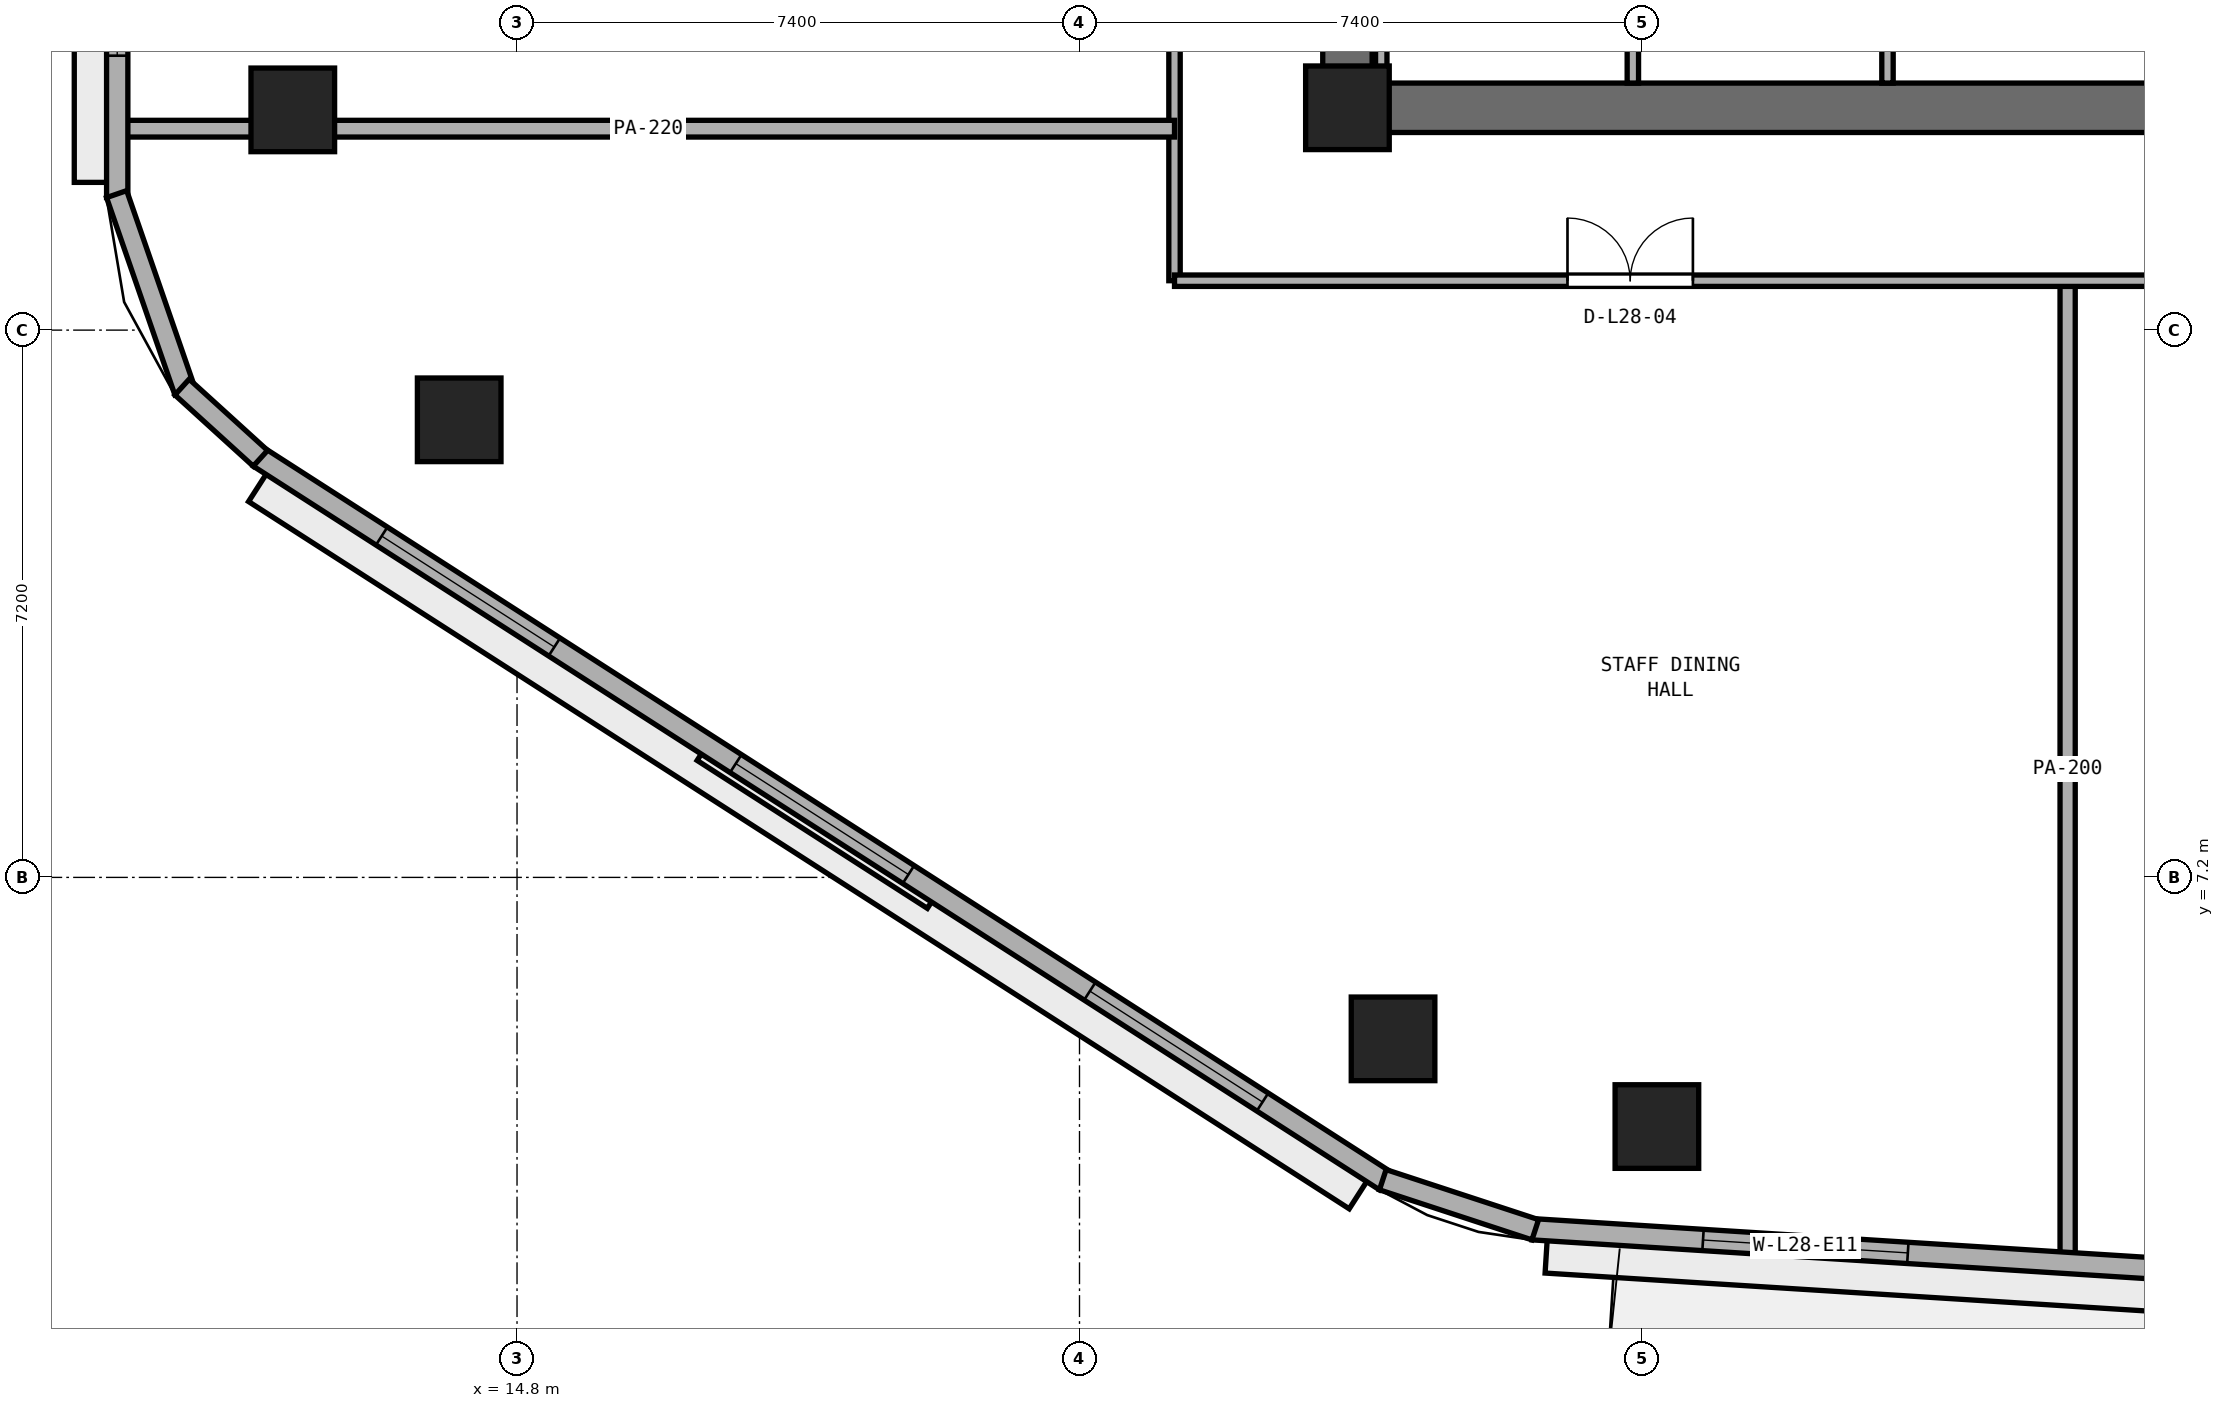
"""IFC4 building model, lengths in metres.
Left out: names, types, materials, properties, quantities, classifications, styles, units other than length and angle.
Written with IfcOpenShell. Run it as: python <this file> out.ifc"""

import sys

from ifc_helpers import new_model, si_unit, direction, frame, frame_2d, origin, origin_2d, place, context, subcontext, project, spatial, rectangle, extrude, element, fill, save


model = new_model("IFC4")
c1 = context("Model", 3, precision=1e-05, world=origin(), true_north=direction((0.0, 1.0)))
c2 = subcontext(c1, "Body", "Model", "MODEL_VIEW")
j1 = project(units=[si_unit("LENGTHUNIT", "METRE"), si_unit("PLANEANGLEUNIT", "RADIAN")], contexts=[c1])
p1 = place(None, origin())
s1 = spatial("IfcSite", under=j1, at=p1, CompositionType="ELEMENT")
p2 = place(p1, origin())
s2 = spatial("IfcBuilding", under=s1, at=p2, CompositionType="ELEMENT")
p3 = place(p2, frame((0.0, 0.0, 112.4)))
s3 = spatial("IfcBuildingStorey", under=s2, at=p3, CompositionType="ELEMENT", Elevation=112.4)
p4 = place(p3, frame((25.4, 17.325, 0.0), z_axis=(0.0, 0.0, 1.0), x_axis=(1.0, 0.0, 0.0)))
e1 = element("IfcWall", 1, at=p4, inside=s3, PredefinedType="SHEAR", context=c2, shape_type="SweptSolid", body=[
    extrude(rectangle(XDim=23.2, YDim=0.65, at=frame_2d((11.6, 0.0))), origin(), (0.0, 0.0, 1.0), 3.525),
])
p5 = place(p3, frame((25.725, 17.65, 0.0), z_axis=(0.0, 0.0, 1.0), x_axis=(0.0, 1.0, 0.0)))
e2 = element("IfcWall", 2, at=p5, inside=s3, PredefinedType="SHEAR", context=c2, shape_type="SweptSolid", body=[
    extrude(rectangle(XDim=15.1, YDim=0.65, at=frame_2d((7.55, 0.0))), origin(), (0.0, 0.0, 1.0), 3.525),
])
p6 = place(p5, frame((6.8, 0.0, 0.0)))
e3 = element("IfcOpeningElement", 3, at=p6, cuts=e2, PredefinedType="OPENING", context=c2, shape_type="SweptSolid", body=[
    extrude(rectangle(XDim=1.5, YDim=2.15, at=frame_2d((0.75, 1.075))), frame((0.0, 0.335, 0.0), z_axis=(0.0, -1.0, 0.0), x_axis=(1.0, 0.0, 0.0)), (0.0, 0.0, 1.0), 0.67),
])
p7 = place(p3, frame((25.725, 17.325, 0.0), z_axis=(0.0, 0.0, 1.0), x_axis=(1.0, 0.0, 0.0)))
e4 = element("IfcColumn", 4, at=p7, inside=s3, PredefinedType="PILASTER", context=c2, shape_type="SweptSolid", body=[
    extrude(rectangle(XDim=1.1, YDim=1.1, at=origin_2d()), origin(), (0.0, 0.0, 1.0), 3.8),
])
for number, where, z_axis, x_axis in (
    (5, (29.796, 3.922, 0.0), (0.0, 0.0, 1.0), (1.0, 0.0, 0.0)),
    (6, (11.85, 17.298, 0.0), (0.0, 0.0, 1.0), (1.0, 0.0, 0.0)),
    (7, (14.039, 13.22, 0.0), (0.0, 0.0, 1.0), (1.0, 0.0, 0.0)),
    (8, (26.325, 5.076, 0.0), (0.0, 0.0, 1.0), (1.0, 0.0, 0.0)),
):
    element("IfcColumn", number, at=place(p3, frame(where, z_axis=z_axis, x_axis=x_axis)), inside=s3, PredefinedType="COLUMN", context=c2, shape_type="SweptSolid", body=[
        extrude(rectangle(XDim=1.1, YDim=1.1, at=origin_2d()), origin(), (0.0, 0.0, 1.0), 3.8),
    ])
for number, where, z_axis, x_axis in (
    (9, (26.17, 17.65, 0.0), (0.0, 0.0, 1.0), (0.0, 1.0, 0.0)),
    (10, (29.48, 17.65, 0.0), (0.0, 0.0, 1.0), (0.0, 1.0, 0.0)),
    (11, (32.83, 17.65, 0.0), (0.0, 0.0, 1.0), (0.0, 1.0, 0.0)),
):
    element("IfcWall", number, at=place(p3, frame(where, z_axis=z_axis, x_axis=x_axis)), inside=s3, PredefinedType="PARTITIONING", context=c2, shape_type="SweptSolid", body=[
        extrude(rectangle(XDim=2.1, YDim=0.15, at=frame_2d((1.05, 0.0))), origin(), (0.0, 0.0, 1.0), 3.525),
    ])
p8 = place(p3, frame((35.2, 2.192, 0.0), z_axis=(0.0, 0.0, 1.0), x_axis=(0.0, 1.0, 0.0)))
e12 = element("IfcWall", 12, at=p8, inside=s3, PredefinedType="PARTITIONING", context=c2, shape_type="SweptSolid", body=[
    extrude(rectangle(XDim=12.858, YDim=0.2, at=frame_2d((6.429, 0.0))), origin(), (0.0, 0.0, 1.0), 3.525),
])
p9 = place(p3, frame((23.45, 15.05, 0.0), z_axis=(0.0, 0.0, 1.0), x_axis=(0.0, 1.0, 0.0)))
e13 = element("IfcWall", 13, at=p9, inside=s3, PredefinedType="PARTITIONING", context=c2, shape_type="SweptSolid", body=[
    extrude(rectangle(XDim=20.3, YDim=0.15, at=frame_2d((10.15, 0.0))), origin(), (0.0, 0.0, 1.0), 3.525),
])
p10 = place(p9, frame((8.025, 0.0, 0.0)))
e14 = element("IfcOpeningElement", 14, at=p10, cuts=e13, PredefinedType="OPENING", context=c2, shape_type="SweptSolid", body=[
    extrude(rectangle(XDim=0.9, YDim=2.1, at=frame_2d((0.45, 1.05))), frame((0.0, 0.085, 0.0), z_axis=(0.0, -1.0, 0.0), x_axis=(1.0, 0.0, 0.0)), (0.0, 0.0, 1.0), 0.17),
])
p11 = place(p9, frame((16.175, 0.0, 0.0)))
e15 = element("IfcOpeningElement", 15, at=p11, cuts=e13, PredefinedType="OPENING", context=c2, shape_type="SweptSolid", body=[
    extrude(rectangle(XDim=0.9, YDim=2.1, at=frame_2d((0.45, 1.05))), frame((0.0, 0.085, 0.0), z_axis=(0.0, -1.0, 0.0), x_axis=(1.0, 0.0, 0.0)), (0.0, 0.0, 1.0), 0.17),
])
p12 = place(p3, frame((23.45, 15.05, 0.0), z_axis=(0.0, 0.0, 1.0), x_axis=(1.0, 0.0, 0.0)))
e16 = element("IfcWall", 16, at=p12, inside=s3, PredefinedType="PARTITIONING", context=c2, shape_type="SweptSolid", body=[
    extrude(rectangle(XDim=27.1, YDim=0.15, at=frame_2d((13.55, 0.0))), origin(), (0.0, 0.0, 1.0), 3.525),
])
p13 = place(p12, frame((5.17, 0.0, 0.0)))
e17 = element("IfcOpeningElement", 17, at=p13, cuts=e16, PredefinedType="OPENING", context=c2, shape_type="SweptSolid", body=[
    extrude(rectangle(XDim=1.65, YDim=2.15, at=frame_2d((0.825, 1.075))), frame((0.0, 0.085, 0.0), z_axis=(0.0, -1.0, 0.0), x_axis=(1.0, 0.0, 0.0)), (0.0, 0.0, 1.0), 0.17),
])
p14 = place(p12, frame((18.855, 0.0, 0.0)))
e18 = element("IfcOpeningElement", 18, at=p14, cuts=e16, PredefinedType="OPENING", context=c2, shape_type="SweptSolid", body=[
    extrude(rectangle(XDim=0.9, YDim=2.1, at=frame_2d((0.45, 1.05))), frame((0.0, 0.085, 0.0), z_axis=(0.0, -1.0, 0.0), x_axis=(1.0, 0.0, 0.0)), (0.0, 0.0, 1.0), 0.17),
])
p15 = place(p3, frame((9.605, 17.05, 0.0), z_axis=(0.0, 0.0, 1.0), x_axis=(1.0, 0.0, 0.0)))
e19 = element("IfcWall", 19, at=p15, inside=s3, PredefinedType="PARTITIONING", context=c2, shape_type="SweptSolid", body=[
    extrude(rectangle(XDim=13.845, YDim=0.22, at=frame_2d((6.922, 0.0))), origin(), (0.0, 0.0, 1.0), 2.908),
])
p16 = place(p3, frame((28.161, 2.571, 0.0), z_axis=(0.0, 0.0, 1.0), x_axis=(0.998017288298, -0.06294038654, 0.0)))
e20 = element("IfcWall", 20, at=p16, inside=s3, PredefinedType="STANDARD", context=c2, shape_type="SweptSolid", body=[
    extrude(rectangle(XDim=19.577, YDim=0.28, at=frame_2d((9.789, 0.0))), origin(), (0.0, 0.0, 1.0), 3.525),
])
p17 = place(p16, frame((9.239, 0.0, 0.0)))
e21 = element("IfcOpeningElement", 21, at=p17, cuts=e20, PredefinedType="OPENING", context=c2, shape_type="SweptSolid", body=[
    extrude(rectangle(XDim=1.1, YDim=2.2, at=frame_2d((0.55, 1.1))), frame((0.0, 0.15, 0.0), z_axis=(0.0, -1.0, 0.0), x_axis=(1.0, 0.0, 0.0)), (0.0, 0.0, 1.0), 0.3),
])
p18 = place(p16, frame((2.246, 0.0, 0.9)))
e22 = element("IfcOpeningElement", 22, at=p18, cuts=e20, PredefinedType="OPENING", context=c2, shape_type="SweptSolid", body=[
    extrude(rectangle(XDim=2.7, YDim=1.75, at=frame_2d((1.35, 0.875))), frame((0.0, 0.15, 0.0), z_axis=(0.0, -1.0, 0.0), x_axis=(1.0, 0.0, 0.0)), (0.0, 0.0, 1.0), 0.3),
])
p19 = place(p16, frame((14.631, 0.0, 0.9)))
e23 = element("IfcOpeningElement", 23, at=p19, cuts=e20, PredefinedType="OPENING", context=c2, shape_type="SweptSolid", body=[
    extrude(rectangle(XDim=2.7, YDim=1.75, at=frame_2d((1.35, 0.875))), frame((0.0, 0.15, 0.0), z_axis=(0.0, -1.0, 0.0), x_axis=(1.0, 0.0, 0.0)), (0.0, 0.0, 1.0), 0.3),
])
p20 = place(p3, frame((9.54, 33.444, 0.0), z_axis=(0.0, 0.0, 1.0), x_axis=(0.0, -1.0, 0.0)))
e24 = element("IfcWall", 24, at=p20, inside=s3, PredefinedType="STANDARD", context=c2, shape_type="SweptSolid", body=[
    extrude(rectangle(XDim=17.301, YDim=0.28, at=frame_2d((8.65, 0.0))), origin(), (0.0, 0.0, 1.0), 3.525),
])
p21 = place(p20, frame((7.3, 0.0, 0.9)))
e25 = element("IfcOpeningElement", 25, at=p21, cuts=e24, PredefinedType="OPENING", context=c2, shape_type="SweptSolid", body=[
    extrude(rectangle(XDim=2.7, YDim=1.75, at=frame_2d((1.35, 0.875))), frame((0.0, 0.15, 0.0), z_axis=(0.0, -1.0, 0.0), x_axis=(1.0, 0.0, 0.0)), (0.0, 0.0, 1.0), 0.3),
])
p22 = place(p20, frame((12.734, 0.0, 0.9)))
e26 = element("IfcOpeningElement", 26, at=p22, cuts=e24, PredefinedType="OPENING", context=c2, shape_type="SweptSolid", body=[
    extrude(rectangle(XDim=2.7, YDim=1.75, at=frame_2d((1.35, 0.875))), frame((0.0, 0.15, 0.0), z_axis=(0.0, -1.0, 0.0), x_axis=(1.0, 0.0, 0.0)), (0.0, 0.0, 1.0), 0.3),
])
p23 = place(p3, frame((11.405, 12.728, 0.0), z_axis=(0.0, 0.0, 1.0), x_axis=(0.841304564637, -0.540561402175, 0.0)))
e27 = element("IfcWall", 27, at=p23, inside=s3, PredefinedType="STANDARD", context=c2, shape_type="SweptSolid", body=[
    extrude(rectangle(XDim=17.612, YDim=0.28, at=frame_2d((8.806, 0.0))), origin(), (0.0, 0.0, 1.0), 3.525),
])
p24 = place(p23, frame((1.919, 0.0, 0.9)))
e28 = element("IfcOpeningElement", 28, at=p24, cuts=e27, PredefinedType="OPENING", context=c2, shape_type="SweptSolid", body=[
    extrude(rectangle(XDim=2.7, YDim=1.75, at=frame_2d((1.35, 0.875))), frame((0.0, 0.15, 0.0), z_axis=(0.0, -1.0, 0.0), x_axis=(1.0, 0.0, 0.0)), (0.0, 0.0, 1.0), 0.3),
])
p25 = place(p23, frame((7.456, 0.0, 0.9)))
e29 = element("IfcOpeningElement", 29, at=p25, cuts=e27, PredefinedType="OPENING", context=c2, shape_type="SweptSolid", body=[
    extrude(rectangle(XDim=2.7, YDim=1.75, at=frame_2d((1.35, 0.875))), frame((0.0, 0.15, 0.0), z_axis=(0.0, -1.0, 0.0), x_axis=(1.0, 0.0, 0.0)), (0.0, 0.0, 1.0), 0.3),
])
p26 = place(p23, frame((12.993, 0.0, 0.9)))
e30 = element("IfcOpeningElement", 30, at=p26, cuts=e27, PredefinedType="OPENING", context=c2, shape_type="SweptSolid", body=[
    extrude(rectangle(XDim=2.7, YDim=1.75, at=frame_2d((1.35, 0.875))), frame((0.0, 0.15, 0.0), z_axis=(0.0, -1.0, 0.0), x_axis=(1.0, 0.0, 0.0)), (0.0, 0.0, 1.0), 0.3),
])
p27 = place(p3, frame((9.532, 16.189, 0.0), z_axis=(0.0, 0.0, 1.0), x_axis=(0.32708309668, -0.944995580871, 0.0)))
e31 = element("IfcWall", 31, at=p27, inside=s3, PredefinedType="STANDARD", context=c2, shape_type="SweptSolid", body=[
    extrude(rectangle(XDim=2.748, YDim=0.28, at=frame_2d((1.374, 0.0))), origin(), (0.0, 0.0, 1.0), 3.525),
])
p28 = place(p3, frame((10.393, 13.651, 0.0), z_axis=(0.0, 0.0, 1.0), x_axis=(0.74003521851, -0.672568119498, 0.0)))
e32 = element("IfcWall", 32, at=p28, inside=s3, PredefinedType="STANDARD", context=c2, shape_type="SweptSolid", body=[
    extrude(rectangle(XDim=1.393, YDim=0.28, at=frame_2d((0.697, 0.0))), origin(), (0.0, 0.0, 1.0), 3.525),
])
p29 = place(p3, frame((26.19, 3.223, 0.0), z_axis=(0.0, 0.0, 1.0), x_axis=(0.95016442175, -0.311749212734, 0.0)))
e33 = element("IfcWall", 33, at=p29, inside=s3, PredefinedType="STANDARD", context=c2, shape_type="SweptSolid", body=[
    extrude(rectangle(XDim=2.111, YDim=0.28, at=frame_2d((1.056, 0.0))), origin(), (0.0, 0.0, 1.0), 3.525),
])
p30 = place(p13, origin())
e34 = element("IfcDoor", 34, at=p30, inside=s3, OperationType="DOUBLE_DOOR_SINGLE_SWING", PredefinedType="DOOR", context=c2, shape_type="SweptSolid", body=[
    extrude(rectangle(XDim=1.65, YDim=2.15, at=frame_2d((0.825, 1.075))), frame((0.0, 0.025, 0.0), z_axis=(0.0, -1.0, 0.0), x_axis=(1.0, 0.0, 0.0)), (0.0, 0.0, 1.0), 0.05),
])
fill(e17, e34)
p31 = place(p18, origin())
e35 = element("IfcWindow", 35, at=p31, inside=s3, PartitioningType="SINGLE_PANEL", PredefinedType="WINDOW", context=c2, shape_type="SweptSolid", body=[
    extrude(rectangle(XDim=2.7, YDim=1.75, at=frame_2d((1.35, 0.875))), frame((0.0, 0.03, 0.0), z_axis=(0.0, -1.0, 0.0), x_axis=(1.0, 0.0, 0.0)), (0.0, 0.0, 1.0), 0.06),
])
fill(e22, e35)
p32 = place(p22, origin())
e36 = element("IfcWindow", 36, at=p32, inside=s3, PartitioningType="SINGLE_PANEL", PredefinedType="WINDOW", context=c2, shape_type="SweptSolid", body=[
    extrude(rectangle(XDim=2.7, YDim=1.75, at=frame_2d((1.35, 0.875))), frame((0.0, 0.03, 0.0), z_axis=(0.0, -1.0, 0.0), x_axis=(1.0, 0.0, 0.0)), (0.0, 0.0, 1.0), 0.06),
])
fill(e26, e36)
p33 = place(p24, origin())
e37 = element("IfcWindow", 37, at=p33, inside=s3, PartitioningType="SINGLE_PANEL", PredefinedType="WINDOW", context=c2, shape_type="SweptSolid", body=[
    extrude(rectangle(XDim=2.7, YDim=1.75, at=frame_2d((1.35, 0.875))), frame((0.0, 0.03, 0.0), z_axis=(0.0, -1.0, 0.0), x_axis=(1.0, 0.0, 0.0)), (0.0, 0.0, 1.0), 0.06),
])
fill(e28, e37)
p34 = place(p25, origin())
e38 = element("IfcWindow", 38, at=p34, inside=s3, PartitioningType="SINGLE_PANEL", PredefinedType="WINDOW", context=c2, shape_type="SweptSolid", body=[
    extrude(rectangle(XDim=2.7, YDim=1.75, at=frame_2d((1.35, 0.875))), frame((0.0, 0.03, 0.0), z_axis=(0.0, -1.0, 0.0), x_axis=(1.0, 0.0, 0.0)), (0.0, 0.0, 1.0), 0.06),
])
fill(e29, e38)
p35 = place(p26, origin())
e39 = element("IfcWindow", 39, at=p35, inside=s3, PartitioningType="SINGLE_PANEL", PredefinedType="WINDOW", context=c2, shape_type="SweptSolid", body=[
    extrude(rectangle(XDim=2.7, YDim=1.75, at=frame_2d((1.35, 0.875))), frame((0.0, 0.03, 0.0), z_axis=(0.0, -1.0, 0.0), x_axis=(1.0, 0.0, 0.0)), (0.0, 0.0, 1.0), 0.06),
])
fill(e30, e39)
save(model, sys.argv[1])
